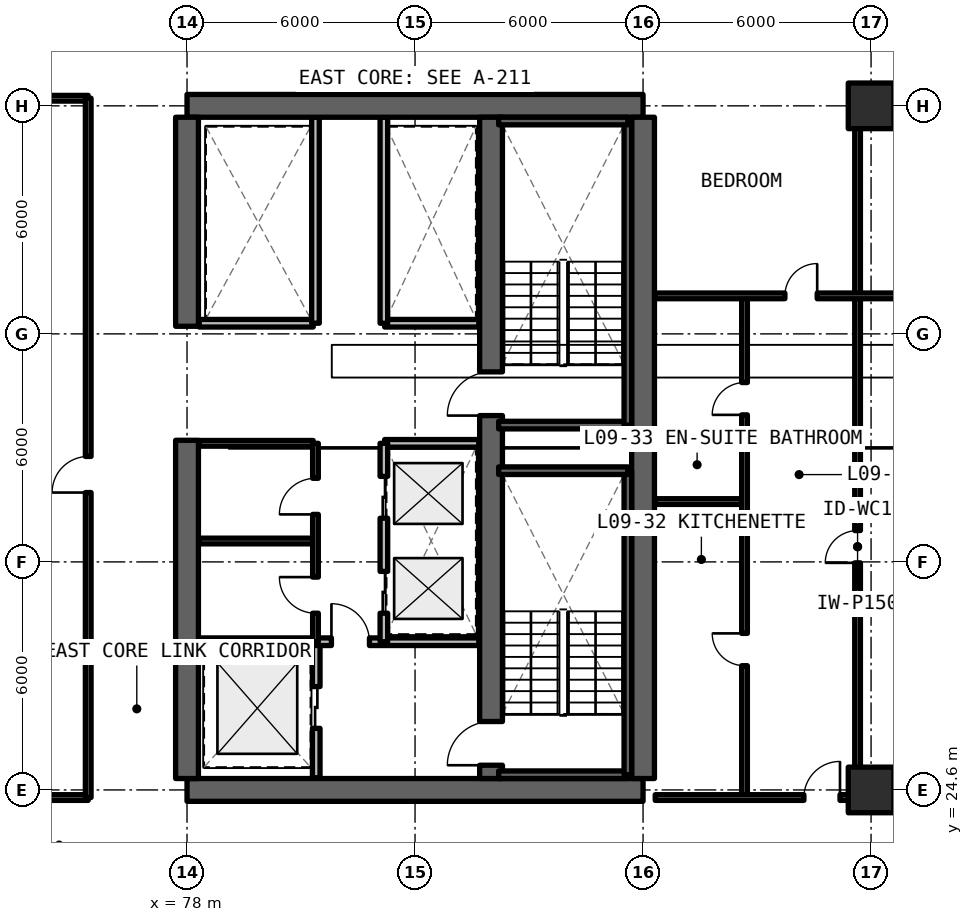
"""IFC4 building model, lengths in metres.
Left out: names, types, materials, properties, quantities, classifications, styles, units other than length and angle.
Written with IfcOpenShell. Run it as: python <this file> out.ifc"""

import sys

from ifc_helpers import new_model, si_unit, direction, frame, frame_2d, origin, origin_2d, place, context, subcontext, project, spatial, rectangle, extrude, element, fill, save


model = new_model("IFC4")
c1 = context("Model", 3, precision=1e-05, world=origin(), true_north=direction((0.0, 1.0)))
c2 = subcontext(c1, "Body", "Model", "MODEL_VIEW")
j1 = project(units=[si_unit("LENGTHUNIT", "METRE"), si_unit("PLANEANGLEUNIT", "RADIAN")], contexts=[c1])
p1 = place(None, origin())
s1 = spatial("IfcSite", under=j1, at=p1, CompositionType="ELEMENT")
p2 = place(p1, origin())
s2 = spatial("IfcBuilding", under=s1, at=p2, CompositionType="ELEMENT")
p3 = place(p2, frame((0.0, 0.0, 35.64)))
s3 = spatial("IfcBuildingStorey", under=s2, at=p3, CompositionType="ELEMENT", Elevation=35.64)
for number, where, z_axis, x_axis in (
    (1, (78.0, 24.6, 0.0), (0.0, 0.0, 1.0), (1.0, 0.0, 0.0)),
    (2, (90.0, 42.6, 0.0), (0.0, 0.0, 1.0), (-1.0, 0.0, 0.0)),
):
    element("IfcWall", number, at=place(p3, frame(where, z_axis=z_axis, x_axis=x_axis)), inside=s3, PredefinedType="SHEAR", context=c2, shape_type="SweptSolid", body=[
        extrude(rectangle(XDim=12.0, YDim=0.6, at=frame_2d((6.0, 0.0))), origin(), (0.0, 0.0, 1.0), 3.3),
    ])
p4 = place(p3, frame((90.0, 24.9, 0.0), z_axis=(0.0, 0.0, 1.0), x_axis=(0.0, 1.0, 0.0)))
e3 = element("IfcWall", 3, at=p4, inside=s3, PredefinedType="SHEAR", context=c2, shape_type="SweptSolid", body=[
    extrude(rectangle(XDim=17.4, YDim=0.6, at=frame_2d((8.7, 0.0))), origin(), (0.0, 0.0, 1.0), 3.3),
])
p5 = place(p3, frame((78.0, 24.9, 0.0), z_axis=(0.0, 0.0, 1.0), x_axis=(0.0, 1.0, 0.0)))
e4 = element("IfcWall", 4, at=p5, inside=s3, PredefinedType="SHEAR", context=c2, shape_type="SweptSolid", body=[
    extrude(rectangle(XDim=8.9, YDim=0.6, at=frame_2d((4.45, 0.0))), origin(), (0.0, 0.0, 1.0), 3.3),
])
p6 = place(p3, frame((78.0, 36.8, 0.0), z_axis=(0.0, 0.0, 1.0), x_axis=(0.0, 1.0, 0.0)))
e5 = element("IfcWall", 5, at=p6, inside=s3, PredefinedType="SHEAR", context=c2, shape_type="SweptSolid", body=[
    extrude(rectangle(XDim=5.5, YDim=0.6, at=frame_2d((2.75, 0.0))), origin(), (0.0, 0.0, 1.0), 3.3),
])
p7 = place(p3, frame((86.0, 24.9, 0.0), z_axis=(0.0, 0.0, 1.0), x_axis=(0.0, 1.0, 0.0)))
e6 = element("IfcWall", 6, at=p7, inside=s3, PredefinedType="SHEAR", context=c2, shape_type="SweptSolid", body=[
    extrude(rectangle(XDim=17.4, YDim=0.6, at=frame_2d((8.7, 0.0))), origin(), (0.0, 0.0, 1.0), 3.3),
])
p8 = place(p7, frame((0.35, 0.0, 0.0)))
e7 = element("IfcOpeningElement", 7, at=p8, cuts=e6, PredefinedType="OPENING", context=c2, shape_type="SweptSolid", body=[
    extrude(rectangle(XDim=1.15, YDim=2.15, at=frame_2d((0.575, 1.075))), frame((0.0, 0.31, 0.0), z_axis=(0.0, -1.0, 0.0), x_axis=(1.0, 0.0, 0.0)), (0.0, 0.0, 1.0), 0.62),
])
p9 = place(p7, frame((9.55, 0.0, 0.0)))
e8 = element("IfcOpeningElement", 8, at=p9, cuts=e6, PredefinedType="OPENING", context=c2, shape_type="SweptSolid", body=[
    extrude(rectangle(XDim=1.15, YDim=2.15, at=frame_2d((0.575, 1.075))), frame((0.0, 0.31, 0.0), z_axis=(0.0, -1.0, 0.0), x_axis=(1.0, 0.0, 0.0)), (0.0, 0.0, 1.0), 0.62),
])
for number, where, z_axis, x_axis in (
    (9, (96.0, 24.6, 0.0), (0.0, 0.0, 1.0), (1.0, 0.0, 0.0)),
    (10, (96.0, 42.6, 0.0), (0.0, 0.0, 1.0), (1.0, 0.0, 0.0)),
):
    element("IfcColumn", number, at=place(p3, frame(where, z_axis=z_axis, x_axis=x_axis)), inside=s3, PredefinedType="COLUMN", context=c2, shape_type="SweptSolid", body=[
        extrude(rectangle(XDim=1.2, YDim=1.2, at=origin_2d()), origin(), (0.0, 0.0, 1.0), 3.3),
    ])
p10 = place(p3, frame((81.4, 24.92, 0.0), z_axis=(0.0, 0.0, 1.0), x_axis=(0.0, 1.0, 0.0)))
e11 = element("IfcWall", 11, at=p10, inside=s3, PredefinedType="SOLIDWALL", context=c2, shape_type="SweptSolid", body=[
    extrude(rectangle(XDim=3.58, YDim=0.2, at=frame_2d((1.79, 0.0))), origin(), (0.0, 0.0, 1.0), 2.35),
])
p11 = place(p10, frame((1.3, 0.0, 0.0)))
e12 = element("IfcOpeningElement", 12, at=p11, cuts=e11, PredefinedType="OPENING", context=c2, shape_type="SweptSolid", body=[
    extrude(rectangle(XDim=1.1, YDim=2.2, at=frame_2d((0.55, 1.1))), frame((0.0, 0.11, 0.0), z_axis=(0.0, -1.0, 0.0), x_axis=(1.0, 0.0, 0.0)), (0.0, 0.0, 1.0), 0.22),
])
p12 = place(p3, frame((78.32, 28.5, 0.0), z_axis=(0.0, 0.0, 1.0), x_axis=(1.0, 0.0, 0.0)))
e13 = element("IfcWall", 13, at=p12, inside=s3, PredefinedType="SOLIDWALL", context=c2, shape_type="SweptSolid", body=[
    extrude(rectangle(XDim=7.36, YDim=0.2, at=frame_2d((3.68, 0.0))), origin(), (0.0, 0.0, 1.0), 2.35),
])
p13 = place(p12, frame((3.48, 0.0, 0.0)))
e14 = element("IfcOpeningElement", 14, at=p13, cuts=e13, PredefinedType="OPENING", context=c2, shape_type="SweptSolid", body=[
    extrude(rectangle(XDim=1.0, YDim=2.15, at=frame_2d((0.5, 1.075))), frame((0.0, 0.11, 0.0), z_axis=(0.0, -1.0, 0.0), x_axis=(1.0, 0.0, 0.0)), (0.0, 0.0, 1.0), 0.22),
])
p14 = place(p3, frame((83.2, 33.72, 0.0), z_axis=(0.0, 0.0, 1.0), x_axis=(1.0, 0.0, 0.0)))
e15 = element("IfcWall", 15, at=p14, inside=s3, PredefinedType="SOLIDWALL", context=c2, shape_type="SweptSolid", body=[
    extrude(rectangle(XDim=2.48, YDim=0.2, at=frame_2d((1.24, 0.0))), origin(), (0.0, 0.0, 1.0), 2.35),
])
p15 = place(p3, frame((83.18, 28.5, 0.0), z_axis=(0.0, 0.0, 1.0), x_axis=(0.0, 1.0, 0.0)))
e16 = element("IfcWall", 16, at=p15, inside=s3, PredefinedType="SOLIDWALL", context=c2, shape_type="SweptSolid", body=[
    extrude(rectangle(XDim=5.22, YDim=0.2, at=frame_2d((2.61, 0.0))), origin(), (0.0, 0.0, 1.0), 2.35),
])
p16 = place(p15, frame((0.75, 0.0, 0.0)))
e17 = element("IfcOpeningElement", 17, at=p16, cuts=e16, PredefinedType="OPENING", context=c2, shape_type="SweptSolid", body=[
    extrude(rectangle(XDim=1.1, YDim=2.2, at=frame_2d((0.55, 1.1))), frame((0.0, 0.11, 0.0), z_axis=(0.0, -1.0, 0.0), x_axis=(1.0, 0.0, 0.0)), (0.0, 0.0, 1.0), 0.22),
])
p17 = place(p15, frame((3.25, 0.0, 0.0)))
e18 = element("IfcOpeningElement", 18, at=p17, cuts=e16, PredefinedType="OPENING", context=c2, shape_type="SweptSolid", body=[
    extrude(rectangle(XDim=1.1, YDim=2.2, at=frame_2d((0.55, 1.1))), frame((0.0, 0.11, 0.0), z_axis=(0.0, -1.0, 0.0), x_axis=(1.0, 0.0, 0.0)), (0.0, 0.0, 1.0), 0.22),
])
for number, where, z_axis, x_axis in (
    (19, (78.32, 31.15, 0.0), (0.0, 0.0, 1.0), (1.0, 0.0, 0.0)),
    (20, (78.32, 33.72, 0.0), (0.0, 0.0, 1.0), (1.0, 0.0, 0.0)),
):
    element("IfcWall", number, at=place(p3, frame(where, z_axis=z_axis, x_axis=x_axis)), inside=s3, PredefinedType="SOLIDWALL", context=c2, shape_type="SweptSolid", body=[
        extrude(rectangle(XDim=3.0, YDim=0.15, at=frame_2d((1.5, 0.0))), origin(), (0.0, 0.0, 1.0), 2.35),
    ])
p18 = place(p3, frame((81.38, 28.5, 0.0), z_axis=(0.0, 0.0, 1.0), x_axis=(0.0, 1.0, 0.0)))
e21 = element("IfcWall", 21, at=p18, inside=s3, PredefinedType="SOLIDWALL", context=c2, shape_type="SweptSolid", body=[
    extrude(rectangle(XDim=5.22, YDim=0.15, at=frame_2d((2.61, 0.0))), origin(), (0.0, 0.0, 1.0), 2.35),
])
p19 = place(p18, frame((0.75, 0.0, 0.0)))
e22 = element("IfcOpeningElement", 22, at=p19, cuts=e21, PredefinedType="OPENING", context=c2, shape_type="SweptSolid", body=[
    extrude(rectangle(XDim=0.95, YDim=2.15, at=frame_2d((0.475, 1.075))), frame((0.0, 0.085, 0.0), z_axis=(0.0, -1.0, 0.0), x_axis=(1.0, 0.0, 0.0)), (0.0, 0.0, 1.0), 0.17),
])
p20 = place(p18, frame((3.35, 0.0, 0.0)))
e23 = element("IfcOpeningElement", 23, at=p20, cuts=e21, PredefinedType="OPENING", context=c2, shape_type="SweptSolid", body=[
    extrude(rectangle(XDim=0.95, YDim=2.15, at=frame_2d((0.475, 1.075))), frame((0.0, 0.085, 0.0), z_axis=(0.0, -1.0, 0.0), x_axis=(1.0, 0.0, 0.0)), (0.0, 0.0, 1.0), 0.17),
])
p21 = place(p3, frame((83.2, 36.88, 0.0), z_axis=(0.0, 0.0, 1.0), x_axis=(1.0, 0.0, 0.0)))
e24 = element("IfcWall", 24, at=p21, inside=s3, PredefinedType="SOLIDWALL", context=c2, shape_type="SweptSolid", body=[
    extrude(rectangle(XDim=2.48, YDim=0.2, at=frame_2d((1.24, 0.0))), origin(), (0.0, 0.0, 1.0), 2.35),
])
p22 = place(p3, frame((83.18, 36.88, 0.0), z_axis=(0.0, 0.0, 1.0), x_axis=(0.0, 1.0, 0.0)))
e25 = element("IfcWall", 25, at=p22, inside=s3, PredefinedType="SOLIDWALL", context=c2, shape_type="SweptSolid", body=[
    extrude(rectangle(XDim=5.42, YDim=0.2, at=frame_2d((2.71, 0.0))), origin(), (0.0, 0.0, 1.0), 2.35),
])
p23 = place(p3, frame((78.32, 36.88, 0.0), z_axis=(0.0, 0.0, 1.0), x_axis=(1.0, 0.0, 0.0)))
e26 = element("IfcWall", 26, at=p23, inside=s3, PredefinedType="SOLIDWALL", context=c2, shape_type="SweptSolid", body=[
    extrude(rectangle(XDim=3.0, YDim=0.2, at=frame_2d((1.5, 0.0))), origin(), (0.0, 0.0, 1.0), 2.35),
])
p24 = place(p3, frame((81.38, 36.88, 0.0), z_axis=(0.0, 0.0, 1.0), x_axis=(0.0, 1.0, 0.0)))
e27 = element("IfcWall", 27, at=p24, inside=s3, PredefinedType="SOLIDWALL", context=c2, shape_type="SweptSolid", body=[
    extrude(rectangle(XDim=5.42, YDim=0.2, at=frame_2d((2.71, 0.0))), origin(), (0.0, 0.0, 1.0), 2.35),
])
for number, where, z_axis, x_axis in (
    (28, (67.15, 24.4, 0.0), (0.0, 0.0, 1.0), (1.0, 0.0, 0.0)),
    (29, (67.15, 42.8, 0.0), (0.0, 0.0, 1.0), (1.0, 0.0, 0.0)),
):
    element("IfcWall", number, at=place(p3, frame(where, z_axis=z_axis, x_axis=x_axis)), inside=s3, PredefinedType="SOLIDWALL", context=c2, shape_type="SweptSolid", body=[
        extrude(rectangle(XDim=8.25, YDim=0.15, at=frame_2d((4.125, 0.0))), origin(), (0.0, 0.0, 1.0), 2.295),
    ])
p25 = place(p3, frame((75.4, 24.4, 0.0), z_axis=(0.0, 0.0, 1.0), x_axis=(0.0, 1.0, 0.0)))
e30 = element("IfcWall", 30, at=p25, inside=s3, PredefinedType="SOLIDWALL", context=c2, shape_type="SweptSolid", body=[
    extrude(rectangle(XDim=18.4, YDim=0.15, at=frame_2d((9.2, 0.0))), origin(), (0.0, 0.0, 1.0), 2.35),
])
p26 = place(p25, frame((8.025, 0.0, 0.0)))
e31 = element("IfcOpeningElement", 31, at=p26, cuts=e30, PredefinedType="OPENING", context=c2, shape_type="SweptSolid", body=[
    extrude(rectangle(XDim=0.95, YDim=2.15, at=frame_2d((0.475, 1.075))), frame((0.0, 0.085, 0.0), z_axis=(0.0, -1.0, 0.0), x_axis=(1.0, 0.0, 0.0)), (0.0, 0.0, 1.0), 0.17),
])
p27 = place(p3, frame((95.645, 24.4, 0.0), z_axis=(0.0, 0.0, 1.0), x_axis=(0.0, 1.0, 0.0)))
e32 = element("IfcWall", 32, at=p27, inside=s3, PredefinedType="PARTITIONING", context=c2, shape_type="SweptSolid", body=[
    extrude(rectangle(XDim=13.2, YDim=0.15, at=frame_2d((6.6, 0.0))), origin(), (0.0, 0.0, 1.0), 2.35),
])
p28 = place(p27, frame((6.175, 0.0, 0.0)))
e33 = element("IfcOpeningElement", 33, at=p28, cuts=e32, PredefinedType="OPENING", context=c2, shape_type="SweptSolid", body=[
    extrude(rectangle(XDim=0.85, YDim=2.1, at=frame_2d((0.425, 1.05))), frame((0.0, 0.085, 0.0), z_axis=(0.0, -1.0, 0.0), x_axis=(1.0, 0.0, 0.0)), (0.0, 0.0, 1.0), 0.17),
])
p29 = place(p3, frame((90.32, 32.188, 0.0), z_axis=(0.0, 0.0, 1.0), x_axis=(1.0, 0.0, 0.0)))
e34 = element("IfcWall", 34, at=p29, inside=s3, PredefinedType="PARTITIONING", context=c2, shape_type="SweptSolid", body=[
    extrude(rectangle(XDim=2.35, YDim=0.15, at=frame_2d((1.175, 0.0))), origin(), (0.0, 0.0, 1.0), 2.35),
])
p30 = place(p3, frame((92.67, 24.4, 0.0), z_axis=(0.0, 0.0, 1.0), x_axis=(0.0, 1.0, 0.0)))
e35 = element("IfcWall", 35, at=p30, inside=s3, PredefinedType="PARTITIONING", context=c2, shape_type="SweptSolid", body=[
    extrude(rectangle(XDim=13.2, YDim=0.15, at=frame_2d((6.6, 0.0))), origin(), (0.0, 0.0, 1.0), 2.35),
])
p31 = place(p30, frame((3.469, 0.0, 0.0)))
e36 = element("IfcOpeningElement", 36, at=p31, cuts=e35, PredefinedType="OPENING", context=c2, shape_type="SweptSolid", body=[
    extrude(rectangle(XDim=0.85, YDim=2.1, at=frame_2d((0.425, 1.05))), frame((0.0, 0.085, 0.0), z_axis=(0.0, -1.0, 0.0), x_axis=(1.0, 0.0, 0.0)), (0.0, 0.0, 1.0), 0.17),
])
p32 = place(p30, frame((10.069, 0.0, 0.0)))
e37 = element("IfcOpeningElement", 37, at=p32, cuts=e35, PredefinedType="OPENING", context=c2, shape_type="SweptSolid", body=[
    extrude(rectangle(XDim=0.85, YDim=2.1, at=frame_2d((0.425, 1.05))), frame((0.0, 0.085, 0.0), z_axis=(0.0, -1.0, 0.0), x_axis=(1.0, 0.0, 0.0)), (0.0, 0.0, 1.0), 0.17),
])
p33 = place(p3, frame((95.645, 37.6, 0.0), z_axis=(0.0, 0.0, 1.0), x_axis=(0.0, 1.0, 0.0)))
e38 = element("IfcWall", 38, at=p33, inside=s3, PredefinedType="PARTITIONING", context=c2, shape_type="SweptSolid", body=[
    extrude(rectangle(XDim=5.2, YDim=0.15, at=frame_2d((2.6, 0.0))), origin(), (0.0, 0.0, 1.0), 2.35),
])
p34 = place(p3, frame((90.32, 37.6, 0.0), z_axis=(0.0, 0.0, 1.0), x_axis=(1.0, 0.0, 0.0)))
e39 = element("IfcWall", 39, at=p34, inside=s3, PredefinedType="PARTITIONING", context=c2, shape_type="SweptSolid", body=[
    extrude(rectangle(XDim=10.24, YDim=0.15, at=frame_2d((5.12, 0.0))), origin(), (0.0, 0.0, 1.0), 2.35),
])
p35 = place(p34, frame((3.412, 0.0, 0.0)))
e40 = element("IfcOpeningElement", 40, at=p35, cuts=e39, PredefinedType="OPENING", context=c2, shape_type="SweptSolid", body=[
    extrude(rectangle(XDim=0.85, YDim=2.1, at=frame_2d((0.425, 1.05))), frame((0.0, 0.085, 0.0), z_axis=(0.0, -1.0, 0.0), x_axis=(1.0, 0.0, 0.0)), (0.0, 0.0, 1.0), 0.17),
])
p36 = place(p34, frame((7.357, 0.0, 0.0)))
e41 = element("IfcOpeningElement", 41, at=p36, cuts=e39, PredefinedType="OPENING", context=c2, shape_type="SweptSolid", body=[
    extrude(rectangle(XDim=0.85, YDim=2.1, at=frame_2d((0.425, 1.05))), frame((0.0, 0.085, 0.0), z_axis=(0.0, -1.0, 0.0), x_axis=(1.0, 0.0, 0.0)), (0.0, 0.0, 1.0), 0.17),
])
p37 = place(p3, frame((90.32, 24.4, 0.0), z_axis=(0.0, 0.0, 1.0), x_axis=(1.0, 0.0, 0.0)))
e42 = element("IfcWall", 42, at=p37, inside=s3, PredefinedType="SOLIDWALL", context=c2, shape_type="SweptSolid", body=[
    extrude(rectangle(XDim=10.24, YDim=0.15, at=frame_2d((5.12, 0.0))), origin(), (0.0, 0.0, 1.0), 2.295),
])
p38 = place(p37, frame((3.913, 0.0, 0.0)))
e43 = element("IfcOpeningElement", 43, at=p38, cuts=e42, PredefinedType="OPENING", context=c2, shape_type="SweptSolid", body=[
    extrude(rectangle(XDim=0.95, YDim=2.15, at=frame_2d((0.475, 1.075))), frame((0.0, 0.085, 0.0), z_axis=(0.0, -1.0, 0.0), x_axis=(1.0, 0.0, 0.0)), (0.0, 0.0, 1.0), 0.17),
])
p39 = place(p3, frame((86.2, 25.0, 0.0), z_axis=(0.0, 0.0, 1.0), x_axis=(1.0, 0.0, 0.0)))
e44 = element("IfcWall", 44, at=p39, inside=s3, PredefinedType="SOLIDWALL", context=c2, shape_type="SweptSolid", body=[
    extrude(rectangle(XDim=3.4, YDim=0.2, at=frame_2d((1.7, 0.0))), origin(), (0.0, 0.0, 1.0), 3.3),
])
p40 = place(p3, frame((89.6, 25.0, 0.0), z_axis=(0.0, 0.0, 1.0), x_axis=(0.0, 1.0, 0.0)))
e45 = element("IfcWall", 45, at=p40, inside=s3, PredefinedType="SOLIDWALL", context=c2, shape_type="SweptSolid", body=[
    extrude(rectangle(XDim=8.0, YDim=0.2, at=frame_2d((4.0, 0.0))), origin(), (0.0, 0.0, 1.0), 3.3),
])
for number, where, z_axis, x_axis in (
    (46, (89.6, 33.0, 0.0), (0.0, 0.0, 1.0), (-1.0, 0.0, 0.0)),
    (47, (86.2, 34.2, 0.0), (0.0, 0.0, 1.0), (1.0, 0.0, 0.0)),
):
    element("IfcWall", number, at=place(p3, frame(where, z_axis=z_axis, x_axis=x_axis)), inside=s3, PredefinedType="SOLIDWALL", context=c2, shape_type="SweptSolid", body=[
        extrude(rectangle(XDim=3.4, YDim=0.2, at=frame_2d((1.7, 0.0))), origin(), (0.0, 0.0, 1.0), 3.3),
    ])
p41 = place(p3, frame((89.6, 34.2, 0.0), z_axis=(0.0, 0.0, 1.0), x_axis=(0.0, 1.0, 0.0)))
e48 = element("IfcWall", 48, at=p41, inside=s3, PredefinedType="SOLIDWALL", context=c2, shape_type="SweptSolid", body=[
    extrude(rectangle(XDim=8.0, YDim=0.2, at=frame_2d((4.0, 0.0))), origin(), (0.0, 0.0, 1.0), 3.3),
])
p42 = place(p3, frame((89.6, 42.2, 0.0), z_axis=(0.0, 0.0, 1.0), x_axis=(-1.0, 0.0, 0.0)))
e49 = element("IfcWall", 49, at=p42, inside=s3, PredefinedType="SOLIDWALL", context=c2, shape_type="SweptSolid", body=[
    extrude(rectangle(XDim=3.4, YDim=0.2, at=frame_2d((1.7, 0.0))), origin(), (0.0, 0.0, 1.0), 3.3),
])
p43 = place(p11, origin())
e50 = element("IfcDoor", 50, at=p43, inside=s3, OperationType="SLIDING_TO_LEFT", PredefinedType="DOOR", context=c2, shape_type="SweptSolid", body=[
    extrude(rectangle(XDim=1.1, YDim=2.2, at=frame_2d((0.55, 1.1))), frame((0.0, 0.025, 0.0), z_axis=(0.0, -1.0, 0.0), x_axis=(1.0, 0.0, 0.0)), (0.0, 0.0, 1.0), 0.05),
])
fill(e12, e50)
p44 = place(p13, origin())
e51 = element("IfcDoor", 51, at=p44, inside=s3, OperationType="SINGLE_SWING_LEFT", PredefinedType="DOOR", context=c2, shape_type="SweptSolid", body=[
    extrude(rectangle(XDim=1.0, YDim=2.15, at=frame_2d((0.5, 1.075))), frame((0.0, 0.025, 0.0), z_axis=(0.0, -1.0, 0.0), x_axis=(1.0, 0.0, 0.0)), (0.0, 0.0, 1.0), 0.05),
])
fill(e14, e51)
p45 = place(p16, origin())
e52 = element("IfcDoor", 52, at=p45, inside=s3, OperationType="SLIDING_TO_LEFT", PredefinedType="DOOR", context=c2, shape_type="SweptSolid", body=[
    extrude(rectangle(XDim=1.1, YDim=2.2, at=frame_2d((0.55, 1.1))), frame((0.0, 0.025, 0.0), z_axis=(0.0, -1.0, 0.0), x_axis=(1.0, 0.0, 0.0)), (0.0, 0.0, 1.0), 0.05),
])
fill(e17, e52)
p46 = place(p17, origin())
e53 = element("IfcDoor", 53, at=p46, inside=s3, OperationType="SLIDING_TO_RIGHT", PredefinedType="DOOR", context=c2, shape_type="SweptSolid", body=[
    extrude(rectangle(XDim=1.1, YDim=2.2, at=frame_2d((0.55, 1.1))), frame((0.0, 0.025, 0.0), z_axis=(0.0, -1.0, 0.0), x_axis=(1.0, 0.0, 0.0)), (0.0, 0.0, 1.0), 0.05),
])
fill(e18, e53)
p47 = place(p19, origin())
e54 = element("IfcDoor", 54, at=p47, inside=s3, OperationType="SINGLE_SWING_RIGHT", PredefinedType="DOOR", context=c2, shape_type="SweptSolid", body=[
    extrude(rectangle(XDim=0.95, YDim=2.15, at=frame_2d((0.475, 1.075))), frame((0.0, 0.025, 0.0), z_axis=(0.0, -1.0, 0.0), x_axis=(1.0, 0.0, 0.0)), (0.0, 0.0, 1.0), 0.05),
])
fill(e22, e54)
p48 = place(p20, origin())
e55 = element("IfcDoor", 55, at=p48, inside=s3, OperationType="SINGLE_SWING_LEFT", PredefinedType="DOOR", context=c2, shape_type="SweptSolid", body=[
    extrude(rectangle(XDim=0.95, YDim=2.15, at=frame_2d((0.475, 1.075))), frame((0.0, 0.025, 0.0), z_axis=(0.0, -1.0, 0.0), x_axis=(1.0, 0.0, 0.0)), (0.0, 0.0, 1.0), 0.05),
])
fill(e23, e55)
p49 = place(p26, origin())
e56 = element("IfcDoor", 56, at=p49, inside=s3, OperationType="SINGLE_SWING_LEFT", PredefinedType="DOOR", context=c2, shape_type="SweptSolid", body=[
    extrude(rectangle(XDim=0.95, YDim=2.15, at=frame_2d((0.475, 1.075))), frame((0.0, 0.025, 0.0), z_axis=(0.0, -1.0, 0.0), x_axis=(1.0, 0.0, 0.0)), (0.0, 0.0, 1.0), 0.05),
])
fill(e31, e56)
p50 = place(p28, origin())
e57 = element("IfcDoor", 57, at=p50, inside=s3, OperationType="SINGLE_SWING_LEFT", PredefinedType="DOOR", context=c2, shape_type="SweptSolid", body=[
    extrude(rectangle(XDim=0.85, YDim=2.1, at=frame_2d((0.425, 1.05))), frame((0.0, 0.025, 0.0), z_axis=(0.0, -1.0, 0.0), x_axis=(1.0, 0.0, 0.0)), (0.0, 0.0, 1.0), 0.05),
])
fill(e33, e57)
p51 = place(p31, origin())
e58 = element("IfcDoor", 58, at=p51, inside=s3, OperationType="SINGLE_SWING_RIGHT", PredefinedType="DOOR", context=c2, shape_type="SweptSolid", body=[
    extrude(rectangle(XDim=0.85, YDim=2.1, at=frame_2d((0.425, 1.05))), frame((0.0, 0.025, 0.0), z_axis=(0.0, -1.0, 0.0), x_axis=(1.0, 0.0, 0.0)), (0.0, 0.0, 1.0), 0.05),
])
fill(e36, e58)
p52 = place(p32, origin())
e59 = element("IfcDoor", 59, at=p52, inside=s3, OperationType="SINGLE_SWING_LEFT", PredefinedType="DOOR", context=c2, shape_type="SweptSolid", body=[
    extrude(rectangle(XDim=0.85, YDim=2.1, at=frame_2d((0.425, 1.05))), frame((0.0, 0.025, 0.0), z_axis=(0.0, -1.0, 0.0), x_axis=(1.0, 0.0, 0.0)), (0.0, 0.0, 1.0), 0.05),
])
fill(e37, e59)
p53 = place(p35, origin())
e60 = element("IfcDoor", 60, at=p53, inside=s3, OperationType="SINGLE_SWING_RIGHT", PredefinedType="DOOR", context=c2, shape_type="SweptSolid", body=[
    extrude(rectangle(XDim=0.85, YDim=2.1, at=frame_2d((0.425, 1.05))), frame((0.0, 0.025, 0.0), z_axis=(0.0, -1.0, 0.0), x_axis=(1.0, 0.0, 0.0)), (0.0, 0.0, 1.0), 0.05),
])
fill(e40, e60)
p54 = place(p38, origin())
e61 = element("IfcDoor", 61, at=p54, inside=s3, OperationType="SINGLE_SWING_RIGHT", PredefinedType="DOOR", context=c2, shape_type="SweptSolid", body=[
    extrude(rectangle(XDim=0.95, YDim=2.15, at=frame_2d((0.475, 1.075))), frame((0.0, 0.025, 0.0), z_axis=(0.0, -1.0, 0.0), x_axis=(1.0, 0.0, 0.0)), (0.0, 0.0, 1.0), 0.05),
])
fill(e43, e61)
p55 = place(p8, origin())
e62 = element("IfcDoor", 62, at=p55, inside=s3, OperationType="SINGLE_SWING_LEFT", PredefinedType="DOOR", context=c2, shape_type="SweptSolid", body=[
    extrude(rectangle(XDim=1.15, YDim=2.15, at=frame_2d((0.575, 1.075))), frame((0.0, 0.025, 0.0), z_axis=(0.0, -1.0, 0.0), x_axis=(1.0, 0.0, 0.0)), (0.0, 0.0, 1.0), 0.05),
])
fill(e7, e62)
p56 = place(p9, origin())
e63 = element("IfcDoor", 63, at=p56, inside=s3, OperationType="SINGLE_SWING_RIGHT", PredefinedType="DOOR", context=c2, shape_type="SweptSolid", body=[
    extrude(rectangle(XDim=1.15, YDim=2.15, at=frame_2d((0.575, 1.075))), frame((0.0, 0.025, 0.0), z_axis=(0.0, -1.0, 0.0), x_axis=(1.0, 0.0, 0.0)), (0.0, 0.0, 1.0), 0.05),
])
fill(e8, e63)
save(model, sys.argv[1])
